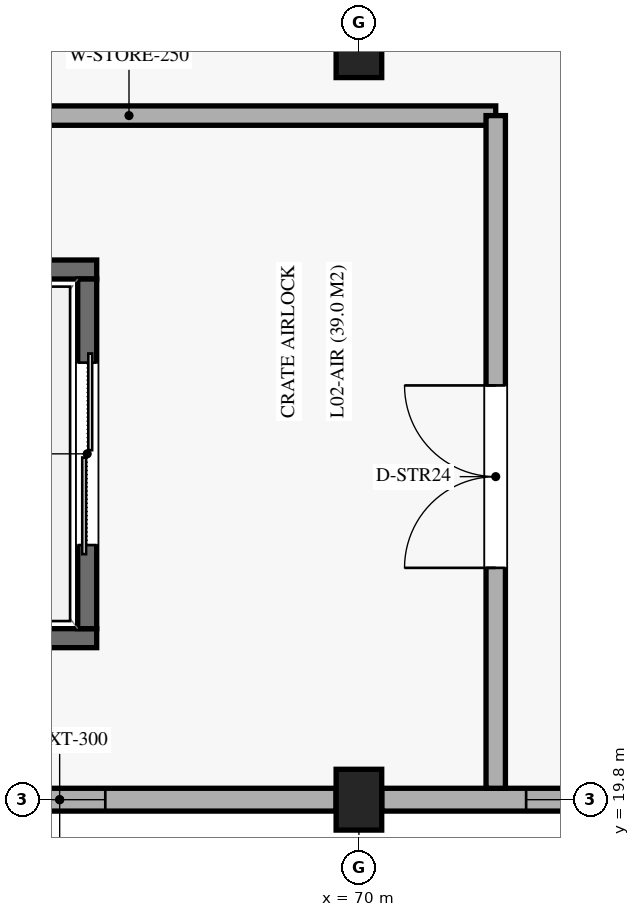
"""IFC4 building model, lengths in metres.
Left out: names, types, materials, properties, quantities, classifications, styles, units other than length and angle.
Written with IfcOpenShell. Run it as: python <this file> out.ifc"""

import sys

from ifc_helpers import new_model, si_unit, direction, frame, frame_2d, origin, origin_2d, place, context, subcontext, project, spatial, rectangle, extrude, element, fill, save


model = new_model("IFC4")
c1 = context("Model", 3, precision=1e-05, world=origin(), true_north=direction((0.0, 1.0)))
c2 = subcontext(c1, "Body", "Model", "MODEL_VIEW")
j1 = project(units=[si_unit("LENGTHUNIT", "METRE"), si_unit("PLANEANGLEUNIT", "RADIAN")], contexts=[c1])
p1 = place(None, origin())
s1 = spatial("IfcSite", under=j1, at=p1, CompositionType="ELEMENT")
p2 = place(p1, origin())
s2 = spatial("IfcBuilding", under=s1, at=p2, CompositionType="ELEMENT")
p3 = place(p2, frame((0.0, 0.0, 10.88)))
s3 = spatial("IfcBuildingStorey", under=s2, at=p3, CompositionType="ELEMENT", Elevation=10.88)
for number, where, z_axis, x_axis in (
    (1, (70.0, 19.8, 0.0), (0.0, 0.0, 1.0), (1.0, 0.0, 0.0)),
    (2, (70.0, 29.7, 0.0), (0.0, 0.0, 1.0), (1.0, 0.0, 0.0)),
):
    element("IfcColumn", number, at=place(p3, frame(where, z_axis=z_axis, x_axis=x_axis)), inside=s3, PredefinedType="COLUMN", context=c2, shape_type="SweptSolid", body=[
        extrude(rectangle(XDim=0.6, YDim=0.8, at=origin_2d()), origin(), (0.0, 0.0, 1.0), 5.44),
    ])
p4 = place(p3, frame((62.425, 19.8, 0.0), z_axis=(0.0, 0.0, 1.0), x_axis=(1.0, 0.0, 0.0)))
e3 = element("IfcWall", 3, at=p4, inside=s3, PredefinedType="SOLIDWALL", context=c2, shape_type="SweptSolid", body=[
    extrude(rectangle(XDim=7.275, YDim=0.3, at=frame_2d((3.637, 0.0))), origin(), (0.0, 0.0, 1.0), 4.38),
])
p5 = place(p4, frame((3.038, 0.0, 1.05)))
e4 = element("IfcOpeningElement", 4, at=p5, cuts=e3, PredefinedType="OPENING", context=c2, shape_type="SweptSolid", body=[
    extrude(rectangle(XDim=1.2, YDim=1.5, at=frame_2d((0.6, 0.75))), frame((0.0, 0.16, 0.0), z_axis=(0.0, -1.0, 0.0), x_axis=(1.0, 0.0, 0.0)), (0.0, 0.0, 1.0), 0.32),
])
p6 = place(p3, frame((70.3, 19.8, 0.0), z_axis=(0.0, 0.0, 1.0), x_axis=(1.0, 0.0, 0.0)))
e5 = element("IfcWall", 5, at=p6, inside=s3, PredefinedType="SOLIDWALL", context=c2, shape_type="SweptSolid", body=[
    extrude(rectangle(XDim=6.4, YDim=0.3, at=frame_2d((3.2, 0.0))), origin(), (0.0, 0.0, 1.0), 4.38),
])
p7 = place(p6, frame((1.9, 0.0, 1.05)))
e6 = element("IfcOpeningElement", 6, at=p7, cuts=e5, PredefinedType="OPENING", context=c2, shape_type="SweptSolid", body=[
    extrude(rectangle(XDim=2.6, YDim=1.85, at=frame_2d((1.3, 0.925))), frame((0.0, 0.16, 0.0), z_axis=(0.0, -1.0, 0.0), x_axis=(1.0, 0.0, 0.0)), (0.0, 0.0, 1.0), 0.32),
])
for number, where, z_axis, x_axis in (
    (7, (62.65, 21.925, 0.0), (0.0, 0.0, 1.0), (1.0, 0.0, 0.0)),
    (8, (62.65, 26.775, 0.0), (0.0, 0.0, 1.0), (1.0, 0.0, 0.0)),
):
    element("IfcWall", number, at=place(p3, frame(where, z_axis=z_axis, x_axis=x_axis)), inside=s3, PredefinedType="SOLIDWALL", context=c2, shape_type="SweptSolid", body=[
        extrude(rectangle(XDim=3.9, YDim=0.25, at=frame_2d((1.95, 0.0))), origin(), (0.0, 0.0, 1.0), 5.14),
    ])
p8 = place(p3, frame((66.425, 22.05, 0.0), z_axis=(0.0, 0.0, 1.0), x_axis=(0.0, 1.0, 0.0)))
e9 = element("IfcWall", 9, at=p8, inside=s3, PredefinedType="SOLIDWALL", context=c2, shape_type="SweptSolid", body=[
    extrude(rectangle(XDim=4.6, YDim=0.25, at=frame_2d((2.3, 0.0))), origin(), (0.0, 0.0, 1.0), 5.14),
])
p9 = place(p8, frame((1.1, 0.0, 0.0)))
e10 = element("IfcOpeningElement", 10, at=p9, cuts=e9, PredefinedType="OPENING", context=c2, shape_type="SweptSolid", body=[
    extrude(rectangle(XDim=2.4, YDim=2.65, at=frame_2d((1.2, 1.325))), frame((0.0, 0.135, 0.0), z_axis=(0.0, -1.0, 0.0), x_axis=(1.0, 0.0, 0.0)), (0.0, 0.0, 1.0), 0.27),
])
p10 = place(p3, frame((62.15, 28.8, 0.0), z_axis=(0.0, 0.0, 1.0), x_axis=(1.0, 0.0, 0.0)))
e11 = element("IfcWall", 11, at=p10, inside=s3, PredefinedType="SOLIDWALL", context=c2, shape_type="SweptSolid", body=[
    extrude(rectangle(XDim=9.65, YDim=0.255, at=frame_2d((4.825, 0.0))), origin(), (0.0, 0.0, 1.0), 4.28),
])
p11 = place(p3, frame((71.8, 19.95, 0.0), z_axis=(0.0, 0.0, 1.0), x_axis=(0.0, 1.0, 0.0)))
e12 = element("IfcWall", 12, at=p11, inside=s3, PredefinedType="SOLIDWALL", context=c2, shape_type="SweptSolid", body=[
    extrude(rectangle(XDim=8.85, YDim=0.255, at=frame_2d((4.425, 0.0))), origin(), (0.0, 0.0, 1.0), 4.28),
])
p12 = place(p11, frame((2.9, 0.0, 0.0)))
e13 = element("IfcOpeningElement", 13, at=p12, cuts=e12, PredefinedType="OPENING", context=c2, shape_type="SweptSolid", body=[
    extrude(rectangle(XDim=2.4, YDim=2.5, at=frame_2d((1.2, 1.25))), frame((0.0, 0.137, 0.0), z_axis=(0.0, -1.0, 0.0), x_axis=(1.0, 0.0, 0.0)), (0.0, 0.0, 1.0), 0.275),
])
p13 = place(p5, origin())
e14 = element("IfcWindow", 14, at=p13, inside=s3, PartitioningType="SINGLE_PANEL", PredefinedType="WINDOW", context=c2, shape_type="SweptSolid", body=[
    extrude(rectangle(XDim=1.2, YDim=1.5, at=frame_2d((0.6, 0.75))), frame((0.0, 0.03, 0.0), z_axis=(0.0, -1.0, 0.0), x_axis=(1.0, 0.0, 0.0)), (0.0, 0.0, 1.0), 0.06),
])
fill(e4, e14)
p14 = place(p7, origin())
e15 = element("IfcWindow", 15, at=p14, inside=s3, PartitioningType="SINGLE_PANEL", PredefinedType="WINDOW", context=c2, shape_type="SweptSolid", body=[
    extrude(rectangle(XDim=2.6, YDim=1.85, at=frame_2d((1.3, 0.925))), frame((0.0, 0.03, 0.0), z_axis=(0.0, -1.0, 0.0), x_axis=(1.0, 0.0, 0.0)), (0.0, 0.0, 1.0), 0.06),
])
fill(e6, e15)
p15 = place(p9, origin())
e16 = element("IfcDoor", 16, at=p15, inside=s3, OperationType="DOUBLE_DOOR_SLIDING", PredefinedType="DOOR", context=c2, shape_type="SweptSolid", body=[
    extrude(rectangle(XDim=2.4, YDim=2.65, at=frame_2d((1.2, 1.325))), frame((0.0, 0.025, 0.0), z_axis=(0.0, -1.0, 0.0), x_axis=(1.0, 0.0, 0.0)), (0.0, 0.0, 1.0), 0.05),
])
fill(e10, e16)
p16 = place(p12, origin())
e17 = element("IfcDoor", 17, at=p16, inside=s3, OperationType="DOUBLE_DOOR_SINGLE_SWING", PredefinedType="DOOR", context=c2, shape_type="SweptSolid", body=[
    extrude(rectangle(XDim=2.4, YDim=2.5, at=frame_2d((1.2, 1.25))), frame((0.0, 0.025, 0.0), z_axis=(0.0, -1.0, 0.0), x_axis=(1.0, 0.0, 0.0)), (0.0, 0.0, 1.0), 0.05),
])
fill(e13, e17)
save(model, sys.argv[1])
